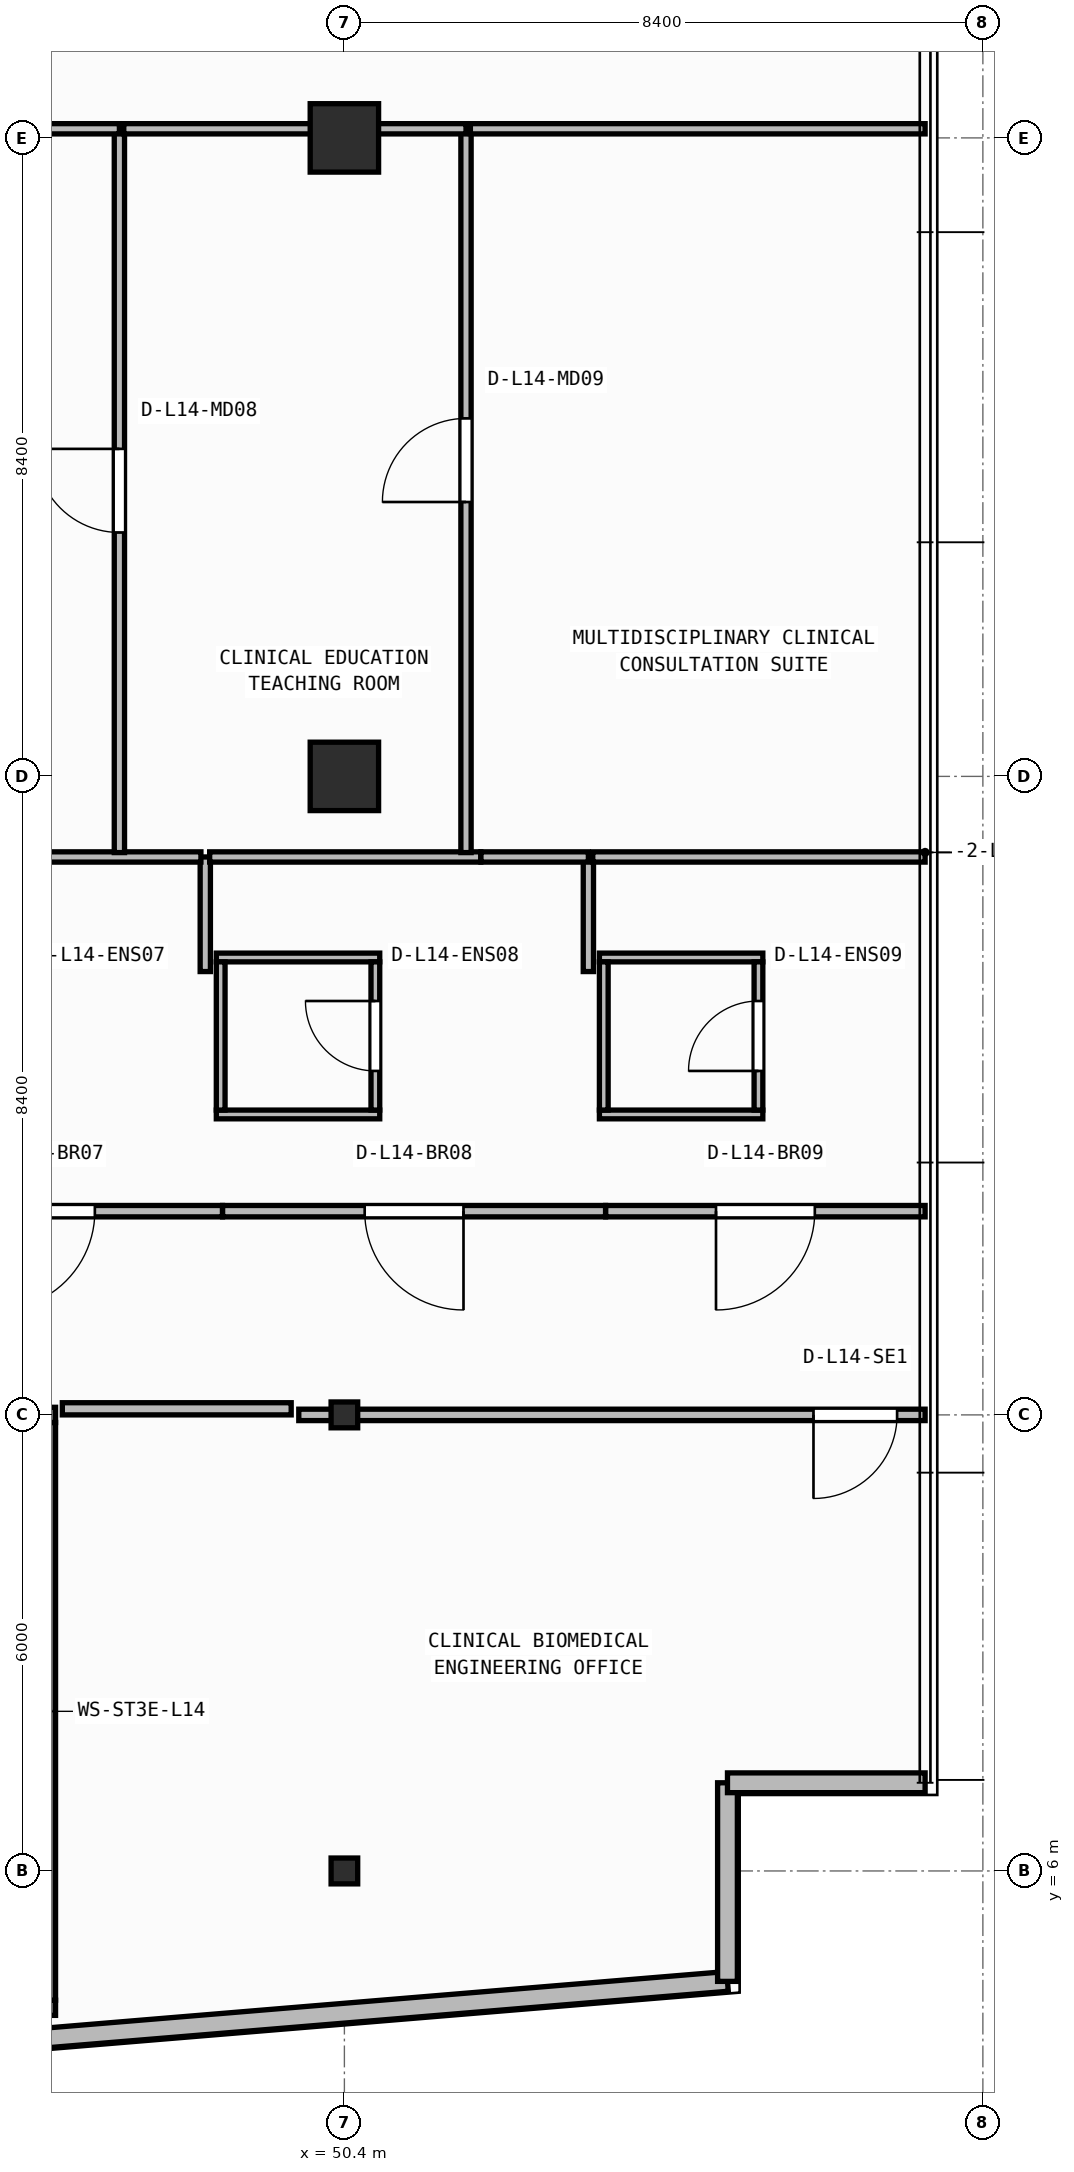
"""IFC4 building model, lengths in metres.
Left out: names, types, materials, properties, quantities, classifications, styles, units other than length and angle.
Written with IfcOpenShell. Run it as: python <this file> out.ifc"""

import sys

from ifc_helpers import new_model, si_unit, direction, frame, frame_2d, origin, origin_2d, place, context, subcontext, project, spatial, rectangle, i_section, extrude, element, fill, save


model = new_model("IFC4")
c1 = context("Model", 3, precision=1e-05, world=origin(), true_north=direction((0.0, 1.0)))
c2 = subcontext(c1, "Body", "Model", "MODEL_VIEW")
j1 = project(units=[si_unit("LENGTHUNIT", "METRE"), si_unit("PLANEANGLEUNIT", "RADIAN")], contexts=[c1])
p1 = place(None, origin())
s1 = spatial("IfcSite", under=j1, at=p1, CompositionType="ELEMENT")
p2 = place(p1, origin())
s2 = spatial("IfcBuilding", under=s1, at=p2, CompositionType="ELEMENT")
p3 = place(p2, frame((0.0, 0.0, 58.05)))
s3 = spatial("IfcBuildingStorey", under=s2, at=p3, CompositionType="ELEMENT", Elevation=58.05)
for number, where, z_axis, x_axis in (
    (1, (50.4, 6.0, 0.0), (0.0, 0.0, 1.0), (1.0, 0.0, 0.0)),
    (2, (50.4, 12.0, 0.0), (0.0, 0.0, 1.0), (1.0, 0.0, 0.0)),
):
    element("IfcColumn", number, at=place(p3, frame(where, z_axis=z_axis, x_axis=x_axis)), inside=s3, PredefinedType="COLUMN", context=c2, shape_type="SweptSolid", body=[
        extrude(i_section(OverallWidth=0.35, OverallDepth=0.34, WebThickness=0.016, FlangeThickness=0.028, at=origin_2d()), origin(), (0.0, 0.0, 1.0), 3.95),
    ])
for number, where, z_axis, x_axis in (
    (3, (50.4, 20.4, 0.0), (0.0, 0.0, 1.0), (1.0, 0.0, 0.0)),
    (4, (50.4, 28.8, 0.0), (0.0, 0.0, 1.0), (1.0, 0.0, 0.0)),
):
    element("IfcColumn", number, at=place(p3, frame(where, z_axis=z_axis, x_axis=x_axis)), inside=s3, PredefinedType="COLUMN", context=c2, shape_type="SweptSolid", body=[
        extrude(rectangle(XDim=0.9, YDim=0.9, at=origin_2d()), origin(), (0.0, 0.0, 1.0), 3.95),
    ])
p4 = place(p3, frame((2.76, 0.174, 0.0), z_axis=(0.0, 0.0, 1.0), x_axis=(0.996571478456, 0.082736257641, 0.0)))
e5 = element("IfcWall", 5, at=p4, inside=s3, PredefinedType="STANDARD", context=c2, shape_type="SweptSolid", body=[
    extrude(rectangle(XDim=52.861, YDim=0.26, at=frame_2d((26.431, 0.0))), origin(), (0.0, 0.0, 1.0), 3.71),
])
p5 = place(p4, frame((25.231, 0.0, 0.9)))
e6 = element("IfcOpeningElement", 6, at=p5, cuts=e5, PredefinedType="OPENING", context=c2, shape_type="SweptSolid", body=[
    extrude(rectangle(XDim=2.4, YDim=1.65, at=frame_2d((1.2, 0.825))), frame((0.0, 0.14, 0.0), z_axis=(0.0, -1.0, 0.0), x_axis=(1.0, 0.0, 0.0)), (0.0, 0.0, 1.0), 0.28),
])
p6 = place(p3, frame((55.44, 4.547, 0.0), z_axis=(0.0, 0.0, 1.0), x_axis=(0.0, 1.0, 0.0)))
e7 = element("IfcWall", 7, at=p6, inside=s3, PredefinedType="STANDARD", context=c2, shape_type="SweptSolid", body=[
    extrude(rectangle(XDim=2.613, YDim=0.26, at=frame_2d((1.306, 0.0))), origin(), (0.0, 0.0, 1.0), 3.71),
])
p7 = place(p3, frame((55.44, 7.16, 0.0), z_axis=(0.0, 0.0, 1.0), x_axis=(1.0, 0.0, 0.0)))
e8 = element("IfcWall", 8, at=p7, inside=s3, PredefinedType="STANDARD", context=c2, shape_type="SweptSolid", body=[
    extrude(rectangle(XDim=2.6, YDim=0.26, at=frame_2d((1.3, 0.0))), origin(), (0.0, 0.0, 1.0), 3.71),
])
p8 = place(p3, frame((42.9, 4.2, 0.0), z_axis=(0.0, 0.0, 1.0), x_axis=(1.0, 0.0, 0.0)))
e9 = element("IfcWall", 9, at=p8, inside=s3, PredefinedType="SHEAR", context=c2, shape_type="SweptSolid", body=[
    extrude(rectangle(XDim=3.7, YDim=0.2, at=frame_2d((1.85, 0.0))), origin(), (0.0, 0.0, 1.0), 3.71),
])
p9 = place(p3, frame((46.5, 4.3, 0.0), z_axis=(0.0, 0.0, 1.0), x_axis=(0.0, 1.0, 0.0)))
e10 = element("IfcWall", 10, at=p9, inside=s3, PredefinedType="SHEAR", context=c2, shape_type="SweptSolid", body=[
    extrude(rectangle(XDim=7.6, YDim=0.2, at=frame_2d((3.8, 0.0))), origin(), (0.0, 0.0, 1.0), 3.71),
])
p10 = place(p3, frame((42.9, 12.0, 0.0), z_axis=(0.0, 0.0, 1.0), x_axis=(1.0, 0.0, 0.0)))
e11 = element("IfcWall", 11, at=p10, inside=s3, PredefinedType="SHEAR", context=c2, shape_type="SweptSolid", body=[
    extrude(rectangle(XDim=3.7, YDim=0.2, at=frame_2d((1.85, 0.0))), origin(), (0.0, 0.0, 1.0), 3.71),
])
p11 = place(p10, frame((1.2, 0.0, 0.0)))
e12 = element("IfcOpeningElement", 12, at=p11, cuts=e11, PredefinedType="OPENING", context=c2, shape_type="SweptSolid", body=[
    extrude(rectangle(XDim=1.3, YDim=2.15, at=frame_2d((0.65, 1.075))), frame((0.0, 0.11, 0.0), z_axis=(0.0, -1.0, 0.0), x_axis=(1.0, 0.0, 0.0)), (0.0, 0.0, 1.0), 0.22),
])
p12 = place(p3, frame((48.715, 15.952, 0.0), z_axis=(0.0, 0.0, 1.0), x_axis=(1.0, 0.0, 0.0)))
e13 = element("IfcWall", 13, at=p12, inside=s3, PredefinedType="PARTITIONING", context=c2, shape_type="SweptSolid", body=[
    extrude(rectangle(XDim=2.15, YDim=0.115, at=frame_2d((1.075, 0.0))), origin(), (0.0, 0.0, 1.0), 3.429),
])
p13 = place(p3, frame((48.715, 18.018, 0.0), z_axis=(0.0, 0.0, 1.0), x_axis=(1.0, 0.0, 0.0)))
e14 = element("IfcWall", 14, at=p13, inside=s3, PredefinedType="PARTITIONING", context=c2, shape_type="SweptSolid", body=[
    extrude(rectangle(XDim=2.15, YDim=0.115, at=frame_2d((1.075, 0.0))), origin(), (0.0, 0.0, 1.0), 3.71),
])
p14 = place(p3, frame((48.772, 16.01, 0.0), z_axis=(0.0, 0.0, 1.0), x_axis=(0.0, 1.0, 0.0)))
e15 = element("IfcWall", 15, at=p14, inside=s3, PredefinedType="PARTITIONING", context=c2, shape_type="SweptSolid", body=[
    extrude(rectangle(XDim=1.95, YDim=0.115, at=frame_2d((0.975, 0.0))), origin(), (0.0, 0.0, 1.0), 3.71),
])
p15 = place(p3, frame((50.808, 16.01, 0.0), z_axis=(0.0, 0.0, 1.0), x_axis=(0.0, 1.0, 0.0)))
e16 = element("IfcWall", 16, at=p15, inside=s3, PredefinedType="PARTITIONING", context=c2, shape_type="SweptSolid", body=[
    extrude(rectangle(XDim=1.95, YDim=0.115, at=frame_2d((0.975, 0.0))), origin(), (0.0, 0.0, 1.0), 3.073),
])
p16 = place(p15, frame((0.515, 0.0, 0.0)))
e17 = element("IfcOpeningElement", 17, at=p16, cuts=e16, PredefinedType="OPENING", context=c2, shape_type="SweptSolid", body=[
    extrude(rectangle(XDim=0.92, YDim=2.1, at=frame_2d((0.46, 1.05))), frame((0.0, 0.067, 0.0), z_axis=(0.0, -1.0, 0.0), x_axis=(1.0, 0.0, 0.0)), (0.0, 0.0, 1.0), 0.135),
])
for number, where, z_axis, x_axis in (
    (18, (53.755, 15.952, 0.0), (0.0, 0.0, 1.0), (1.0, 0.0, 0.0)),
    (19, (53.755, 18.018, 0.0), (0.0, 0.0, 1.0), (1.0, 0.0, 0.0)),
):
    element("IfcWall", number, at=place(p3, frame(where, z_axis=z_axis, x_axis=x_axis)), inside=s3, PredefinedType="PARTITIONING", context=c2, shape_type="SweptSolid", body=[
        extrude(rectangle(XDim=2.15, YDim=0.115, at=frame_2d((1.075, 0.0))), origin(), (0.0, 0.0, 1.0), 3.71),
    ])
p17 = place(p3, frame((53.812, 16.01, 0.0), z_axis=(0.0, 0.0, 1.0), x_axis=(0.0, 1.0, 0.0)))
e20 = element("IfcWall", 20, at=p17, inside=s3, PredefinedType="PARTITIONING", context=c2, shape_type="SweptSolid", body=[
    extrude(rectangle(XDim=1.95, YDim=0.115, at=frame_2d((0.975, 0.0))), origin(), (0.0, 0.0, 1.0), 3.71),
])
p18 = place(p3, frame((55.847, 16.01, 0.0), z_axis=(0.0, 0.0, 1.0), x_axis=(0.0, 1.0, 0.0)))
e21 = element("IfcWall", 21, at=p18, inside=s3, PredefinedType="PARTITIONING", context=c2, shape_type="SweptSolid", body=[
    extrude(rectangle(XDim=1.95, YDim=0.115, at=frame_2d((0.975, 0.0))), origin(), (0.0, 0.0, 1.0), 3.71),
])
p19 = place(p18, frame((0.515, 0.0, 0.0)))
e22 = element("IfcOpeningElement", 22, at=p19, cuts=e21, PredefinedType="OPENING", context=c2, shape_type="SweptSolid", body=[
    extrude(rectangle(XDim=0.92, YDim=2.1, at=frame_2d((0.46, 1.05))), frame((0.0, 0.067, 0.0), z_axis=(0.0, -1.0, 0.0), x_axis=(1.0, 0.0, 0.0)), (0.0, 0.0, 1.0), 0.135),
])
p20 = place(p3, frame((58.04, 12.0, 0.0), z_axis=(0.0, 0.0, 1.0), x_axis=(-1.0, 0.0, 0.0)))
e23 = element("IfcWall", 23, at=p20, inside=s3, PredefinedType="PARTITIONING", context=c2, shape_type="SweptSolid", body=[
    extrude(rectangle(XDim=8.24, YDim=0.15, at=frame_2d((4.12, 0.0))), origin(), (0.0, 0.0, 1.0), 3.073),
])
p21 = place(p20, frame((0.368, 0.0, 0.0)))
e24 = element("IfcOpeningElement", 24, at=p21, cuts=e23, PredefinedType="OPENING", context=c2, shape_type="SweptSolid", body=[
    extrude(rectangle(XDim=1.1, YDim=2.1, at=frame_2d((0.55, 1.05))), frame((0.0, 0.085, 0.0), z_axis=(0.0, -1.0, 0.0), x_axis=(1.0, 0.0, 0.0)), (0.0, 0.0, 1.0), 0.17),
])
p22 = place(p3, frame((48.796, 14.68, 0.0), z_axis=(0.0, 0.0, 1.0), x_axis=(-1.0, 0.0, 0.0)))
e25 = element("IfcWall", 25, at=p22, inside=s3, PredefinedType="PARTITIONING", context=c2, shape_type="SweptSolid", body=[
    extrude(rectangle(XDim=4.658, YDim=0.15, at=frame_2d((2.329, 0.0))), origin(), (0.0, 0.0, 1.0), 3.71),
])
p23 = place(p22, frame((1.679, 0.0, 0.0)))
e26 = element("IfcOpeningElement", 26, at=p23, cuts=e25, PredefinedType="OPENING", context=c2, shape_type="SweptSolid", body=[
    extrude(rectangle(XDim=1.3, YDim=2.15, at=frame_2d((0.65, 1.075))), frame((0.0, 0.085, 0.0), z_axis=(0.0, -1.0, 0.0), x_axis=(1.0, 0.0, 0.0)), (0.0, 0.0, 1.0), 0.17),
])
p24 = place(p3, frame((53.836, 14.68, 0.0), z_axis=(0.0, 0.0, 1.0), x_axis=(-1.0, 0.0, 0.0)))
e27 = element("IfcWall", 27, at=p24, inside=s3, PredefinedType="PARTITIONING", context=c2, shape_type="SweptSolid", body=[
    extrude(rectangle(XDim=5.038, YDim=0.15, at=frame_2d((2.519, 0.0))), origin(), (0.0, 0.0, 1.0), 3.71),
])
p25 = place(p24, frame((1.869, 0.0, 0.0)))
e28 = element("IfcOpeningElement", 28, at=p25, cuts=e27, PredefinedType="OPENING", context=c2, shape_type="SweptSolid", body=[
    extrude(rectangle(XDim=1.3, YDim=2.15, at=frame_2d((0.65, 1.075))), frame((0.0, 0.085, 0.0), z_axis=(0.0, -1.0, 0.0), x_axis=(1.0, 0.0, 0.0)), (0.0, 0.0, 1.0), 0.17),
])
p26 = place(p3, frame((58.04, 14.68, 0.0), z_axis=(0.0, 0.0, 1.0), x_axis=(-1.0, 0.0, 0.0)))
e29 = element("IfcWall", 29, at=p26, inside=s3, PredefinedType="PARTITIONING", context=c2, shape_type="SweptSolid", body=[
    extrude(rectangle(XDim=4.202, YDim=0.15, at=frame_2d((2.101, 0.0))), origin(), (0.0, 0.0, 1.0), 3.71),
])
p27 = place(p26, frame((1.451, 0.0, 0.0)))
e30 = element("IfcOpeningElement", 30, at=p27, cuts=e29, PredefinedType="OPENING", context=c2, shape_type="SweptSolid", body=[
    extrude(rectangle(XDim=1.3, YDim=2.15, at=frame_2d((0.65, 1.075))), frame((0.0, 0.085, 0.0), z_axis=(0.0, -1.0, 0.0), x_axis=(1.0, 0.0, 0.0)), (0.0, 0.0, 1.0), 0.17),
])
p28 = place(p3, frame((48.57, 17.833, 0.0), z_axis=(0.0, 0.0, 1.0), x_axis=(0.0, 1.0, 0.0)))
e31 = element("IfcWall", 31, at=p28, inside=s3, PredefinedType="PARTITIONING", context=c2, shape_type="SweptSolid", body=[
    extrude(rectangle(XDim=1.508, YDim=0.135, at=frame_2d((0.754, 0.0))), origin(), (0.0, 0.0, 1.0), 3.71),
])
p29 = place(p3, frame((48.512, 19.34, 0.0), z_axis=(0.0, 0.0, 1.0), x_axis=(-1.0, 0.0, 0.0)))
e32 = element("IfcWall", 32, at=p29, inside=s3, PredefinedType="PARTITIONING", context=c2, shape_type="SweptSolid", body=[
    extrude(rectangle(XDim=4.545, YDim=0.135, at=frame_2d((2.272, 0.0))), origin(), (0.0, 0.0, 1.0), 3.71),
])
p30 = place(p3, frame((53.61, 17.833, 0.0), z_axis=(0.0, 0.0, 1.0), x_axis=(0.0, 1.0, 0.0)))
e33 = element("IfcWall", 33, at=p30, inside=s3, PredefinedType="PARTITIONING", context=c2, shape_type="SweptSolid", body=[
    extrude(rectangle(XDim=1.508, YDim=0.135, at=frame_2d((0.754, 0.0))), origin(), (0.0, 0.0, 1.0), 3.71),
])
p31 = place(p3, frame((52.195, 19.34, 0.0), z_axis=(0.0, 0.0, 1.0), x_axis=(-1.0, 0.0, 0.0)))
e34 = element("IfcWall", 34, at=p31, inside=s3, PredefinedType="PARTITIONING", context=c2, shape_type="SweptSolid", body=[
    extrude(rectangle(XDim=3.567, YDim=0.135, at=frame_2d((1.784, 0.0))), origin(), (0.0, 0.0, 1.0), 3.71),
])
p32 = place(p3, frame((53.61, 19.34, 0.0), z_axis=(0.0, 0.0, 1.0), x_axis=(-1.0, 0.0, 0.0)))
e35 = element("IfcWall", 35, at=p32, inside=s3, PredefinedType="PARTITIONING", context=c2, shape_type="SweptSolid", body=[
    extrude(rectangle(XDim=1.414, YDim=0.135, at=frame_2d((0.707, 0.0))), origin(), (0.0, 0.0, 1.0), 3.71),
])
p33 = place(p3, frame((58.04, 19.34, 0.0), z_axis=(0.0, 0.0, 1.0), x_axis=(-1.0, 0.0, 0.0)))
e36 = element("IfcWall", 36, at=p33, inside=s3, PredefinedType="PARTITIONING", context=c2, shape_type="SweptSolid", body=[
    extrude(rectangle(XDim=4.373, YDim=0.135, at=frame_2d((2.186, 0.0))), origin(), (0.0, 0.0, 1.0), 3.71),
])
p34 = place(p3, frame((47.44, 19.397, 0.0), z_axis=(0.0, 0.0, 1.0), x_axis=(0.0, 1.0, 0.0)))
e37 = element("IfcWall", 37, at=p34, inside=s3, PredefinedType="PARTITIONING", context=c2, shape_type="SweptSolid", body=[
    extrude(rectangle(XDim=9.522, YDim=0.135, at=frame_2d((4.761, 0.0))), origin(), (0.0, 0.0, 1.0), 3.71),
])
p35 = place(p34, frame((4.211, 0.0, 0.0)))
e38 = element("IfcOpeningElement", 38, at=p35, cuts=e37, PredefinedType="OPENING", context=c2, shape_type="SweptSolid", body=[
    extrude(rectangle(XDim=1.1, YDim=2.1, at=frame_2d((0.55, 1.05))), frame((0.0, 0.077, 0.0), z_axis=(0.0, -1.0, 0.0), x_axis=(1.0, 0.0, 0.0)), (0.0, 0.0, 1.0), 0.155),
])
p36 = place(p3, frame((47.44, 28.92, 0.0), z_axis=(0.0, 0.0, 1.0), x_axis=(-1.0, 0.0, 0.0)))
e39 = element("IfcWall", 39, at=p36, inside=s3, PredefinedType="PARTITIONING", context=c2, shape_type="SweptSolid", body=[
    extrude(rectangle(XDim=9.373, YDim=0.135, at=frame_2d((4.686, 0.0))), origin(), (0.0, 0.0, 1.0), 3.073),
])
p37 = place(p3, frame((52.0, 19.397, 0.0), z_axis=(0.0, 0.0, 1.0), x_axis=(0.0, 1.0, 0.0)))
e40 = element("IfcWall", 40, at=p37, inside=s3, PredefinedType="PARTITIONING", context=c2, shape_type="SweptSolid", body=[
    extrude(rectangle(XDim=9.522, YDim=0.135, at=frame_2d((4.761, 0.0))), origin(), (0.0, 0.0, 1.0), 3.71),
])
p38 = place(p37, frame((4.612, 0.0, 0.0)))
e41 = element("IfcOpeningElement", 41, at=p38, cuts=e40, PredefinedType="OPENING", context=c2, shape_type="SweptSolid", body=[
    extrude(rectangle(XDim=1.1, YDim=2.1, at=frame_2d((0.55, 1.05))), frame((0.0, 0.077, 0.0), z_axis=(0.0, -1.0, 0.0), x_axis=(1.0, 0.0, 0.0)), (0.0, 0.0, 1.0), 0.155),
])
p39 = place(p3, frame((52.0, 28.92, 0.0), z_axis=(0.0, 0.0, 1.0), x_axis=(-1.0, 0.0, 0.0)))
e42 = element("IfcWall", 42, at=p39, inside=s3, PredefinedType="PARTITIONING", context=c2, shape_type="SweptSolid", body=[
    extrude(rectangle(XDim=4.502, YDim=0.135, at=frame_2d((2.251, 0.0))), origin(), (0.0, 0.0, 1.0), 3.073),
])
p40 = place(p3, frame((58.04, 28.92, 0.0), z_axis=(0.0, 0.0, 1.0), x_axis=(-1.0, 0.0, 0.0)))
e43 = element("IfcWall", 43, at=p40, inside=s3, PredefinedType="PARTITIONING", context=c2, shape_type="SweptSolid", body=[
    extrude(rectangle(XDim=5.982, YDim=0.135, at=frame_2d((2.991, 0.0))), origin(), (0.0, 0.0, 1.0), 3.71),
])
p41 = place(p3, frame((46.689, 12.08, 0.0), z_axis=(0.0, 0.0, 1.0), x_axis=(1.0, 0.0, 0.0)))
e44 = element("IfcWall", 44, at=p41, inside=s3, PredefinedType="PARTITIONING", context=c2, shape_type="SweptSolid", body=[
    extrude(rectangle(XDim=3.011, YDim=0.16, at=frame_2d((1.505, 0.0))), origin(), (0.0, 0.0, 1.0), 3.073),
])
p42 = place(p16, origin())
e45 = element("IfcDoor", 45, at=p42, inside=s3, OperationType="SINGLE_SWING_RIGHT", PredefinedType="DOOR", context=c2, shape_type="SweptSolid", body=[
    extrude(rectangle(XDim=0.92, YDim=2.1, at=frame_2d((0.46, 1.05))), frame((0.0, 0.025, 0.0), z_axis=(0.0, -1.0, 0.0), x_axis=(1.0, 0.0, 0.0)), (0.0, 0.0, 1.0), 0.05),
])
fill(e17, e45)
p43 = place(p19, origin())
e46 = element("IfcDoor", 46, at=p43, inside=s3, OperationType="SINGLE_SWING_LEFT", PredefinedType="DOOR", context=c2, shape_type="SweptSolid", body=[
    extrude(rectangle(XDim=0.92, YDim=2.1, at=frame_2d((0.46, 1.05))), frame((0.0, 0.025, 0.0), z_axis=(0.0, -1.0, 0.0), x_axis=(1.0, 0.0, 0.0)), (0.0, 0.0, 1.0), 0.05),
])
fill(e22, e46)
p44 = place(p21, origin())
e47 = element("IfcDoor", 47, at=p44, inside=s3, OperationType="SINGLE_SWING_RIGHT", PredefinedType="DOOR", context=c2, shape_type="SweptSolid", body=[
    extrude(rectangle(XDim=1.1, YDim=2.1, at=frame_2d((0.55, 1.05))), frame((0.0, 0.025, 0.0), z_axis=(0.0, -1.0, 0.0), x_axis=(1.0, 0.0, 0.0)), (0.0, 0.0, 1.0), 0.05),
])
fill(e24, e47)
p45 = place(p23, origin())
e48 = element("IfcDoor", 48, at=p45, inside=s3, OperationType="SINGLE_SWING_RIGHT", PredefinedType="DOOR", context=c2, shape_type="SweptSolid", body=[
    extrude(rectangle(XDim=1.3, YDim=2.15, at=frame_2d((0.65, 1.075))), frame((0.0, 0.025, 0.0), z_axis=(0.0, -1.0, 0.0), x_axis=(1.0, 0.0, 0.0)), (0.0, 0.0, 1.0), 0.05),
])
fill(e26, e48)
p46 = place(p25, origin())
e49 = element("IfcDoor", 49, at=p46, inside=s3, OperationType="SINGLE_SWING_LEFT", PredefinedType="DOOR", context=c2, shape_type="SweptSolid", body=[
    extrude(rectangle(XDim=1.3, YDim=2.15, at=frame_2d((0.65, 1.075))), frame((0.0, 0.025, 0.0), z_axis=(0.0, -1.0, 0.0), x_axis=(1.0, 0.0, 0.0)), (0.0, 0.0, 1.0), 0.05),
])
fill(e28, e49)
p47 = place(p27, origin())
e50 = element("IfcDoor", 50, at=p47, inside=s3, OperationType="SINGLE_SWING_RIGHT", PredefinedType="DOOR", context=c2, shape_type="SweptSolid", body=[
    extrude(rectangle(XDim=1.3, YDim=2.15, at=frame_2d((0.65, 1.075))), frame((0.0, 0.025, 0.0), z_axis=(0.0, -1.0, 0.0), x_axis=(1.0, 0.0, 0.0)), (0.0, 0.0, 1.0), 0.05),
])
fill(e30, e50)
p48 = place(p35, origin())
e51 = element("IfcDoor", 51, at=p48, inside=s3, OperationType="SINGLE_SWING_RIGHT", PredefinedType="DOOR", context=c2, shape_type="SweptSolid", body=[
    extrude(rectangle(XDim=1.1, YDim=2.1, at=frame_2d((0.55, 1.05))), frame((0.0, 0.025, 0.0), z_axis=(0.0, -1.0, 0.0), x_axis=(1.0, 0.0, 0.0)), (0.0, 0.0, 1.0), 0.05),
])
fill(e38, e51)
p49 = place(p38, origin())
e52 = element("IfcDoor", 52, at=p49, inside=s3, OperationType="SINGLE_SWING_LEFT", PredefinedType="DOOR", context=c2, shape_type="SweptSolid", body=[
    extrude(rectangle(XDim=1.1, YDim=2.1, at=frame_2d((0.55, 1.05))), frame((0.0, 0.025, 0.0), z_axis=(0.0, -1.0, 0.0), x_axis=(1.0, 0.0, 0.0)), (0.0, 0.0, 1.0), 0.05),
])
fill(e41, e52)
save(model, sys.argv[1])
